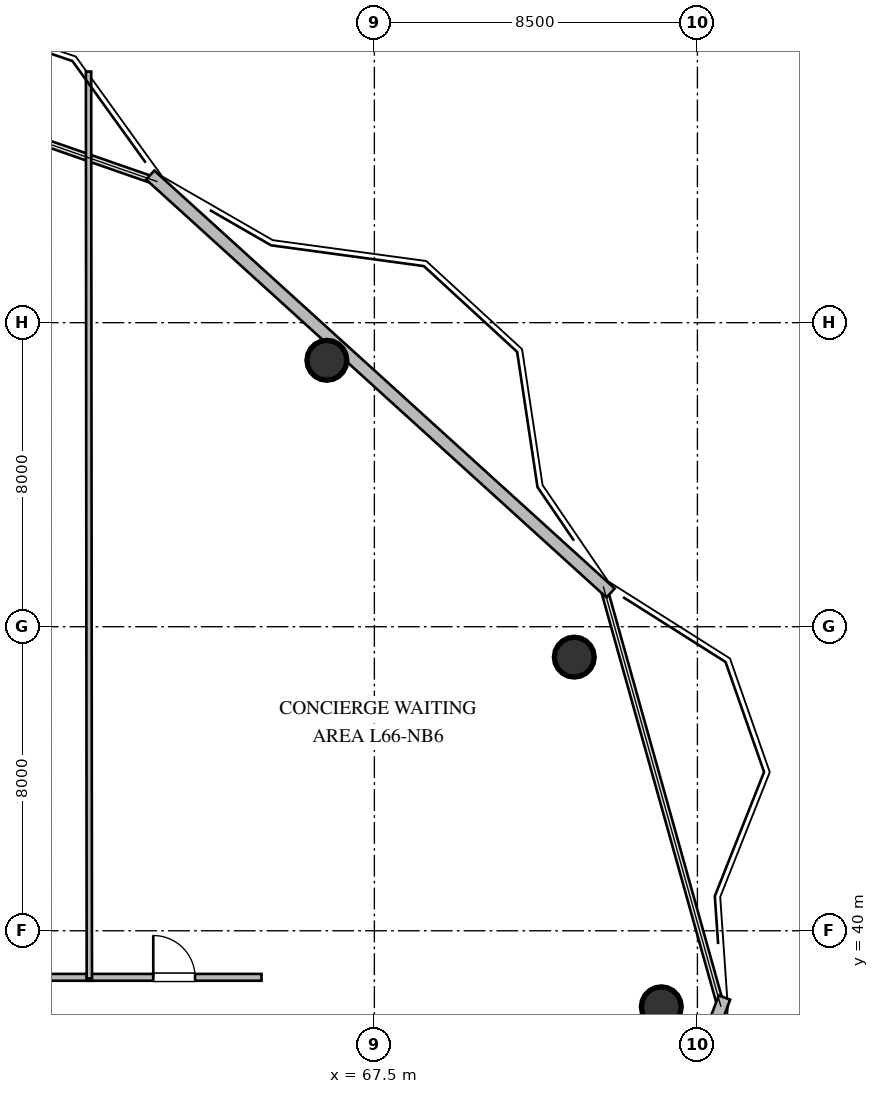
"""IFC4 building model, lengths in metres.
Left out: names, types, materials, properties, quantities, classifications, styles, units other than length and angle.
Written with IfcOpenShell. Run it as: python <this file> out.ifc"""

import sys

from ifc_helpers import new_model, si_unit, direction, frame, frame_2d, origin, origin_2d, place, context, subcontext, project, spatial, rectangle, circle, extrude, element, fill, save


model = new_model("IFC4")
c1 = context("Model", 3, precision=1e-05, world=origin(), true_north=direction((0.0, 1.0)))
c2 = subcontext(c1, "Body", "Model", "MODEL_VIEW")
j1 = project(units=[si_unit("LENGTHUNIT", "METRE"), si_unit("PLANEANGLEUNIT", "RADIAN")], contexts=[c1])
p1 = place(None, origin())
s1 = spatial("IfcSite", under=j1, at=p1, CompositionType="ELEMENT")
p2 = place(p1, origin())
s2 = spatial("IfcBuilding", under=s1, at=p2, CompositionType="ELEMENT")
p3 = place(p2, frame((0.0, 0.0, 249.6)))
s3 = spatial("IfcBuildingStorey", under=s2, at=p3, CompositionType="ELEMENT", Elevation=249.6)
for number, where, z_axis, x_axis in (
    (1, (75.05, 38.0, 0.0), (0.0, 0.0, 1.0), (1.0, 0.0, 0.0)),
    (2, (72.76, 47.2, 0.0), (0.0, 0.0, 1.0), (1.0, 0.0, 0.0)),
    (3, (66.25, 55.01, 0.0), (0.0, 0.0, 1.0), (1.0, 0.0, 0.0)),
):
    element("IfcColumn", number, at=place(p3, frame(where, z_axis=z_axis, x_axis=x_axis)), inside=s3, PredefinedType="COLUMN", context=c2, shape_type="SweptSolid", body=[
        extrude(circle(Radius=0.525, at=origin_2d()), origin(), (0.0, 0.0, 1.0), 3.6),
    ])
p4 = place(p3, frame((76.712, 38.243, 0.0), z_axis=(0.0, 0.0, 1.0), x_axis=(-0.353659523244, -0.935374225441, 0.0)))
e4 = element("IfcWall", 4, at=p4, inside=s3, PredefinedType="STANDARD", context=c2, shape_type="SweptSolid", body=[
    extrude(rectangle(XDim=14.172, YDim=0.32, at=frame_2d((7.086, 0.0))), origin(), (0.0, 0.0, 1.0), 3.28),
])
p5 = place(p3, frame((61.602, 59.884, 0.0), z_axis=(0.0, 0.0, 1.0), x_axis=(0.740416582554, -0.672148260638, 0.0)))
e5 = element("IfcWall", 5, at=p5, inside=s3, PredefinedType="STANDARD", context=c2, shape_type="SweptSolid", body=[
    extrude(rectangle(XDim=16.361, YDim=0.32, at=frame_2d((8.181, 0.0))), origin(), (0.0, 0.0, 1.0), 3.28),
])
p6 = place(p3, frame((54.935, 38.775, 0.0), z_axis=(0.0, 0.0, 1.0), x_axis=(1.0, 0.0, 0.0)))
e6 = element("IfcWall", 6, at=p6, inside=s3, PredefinedType="PARTITIONING", context=c2, shape_type="SweptSolid", body=[
    extrude(rectangle(XDim=5.13, YDim=0.18, at=frame_2d((2.565, 0.0))), origin(), (0.0, 0.0, 1.0), 3.28),
])
p7 = place(p6, frame((2.015, 0.0, 0.0)))
e7 = element("IfcOpeningElement", 7, at=p7, cuts=e6, PredefinedType="OPENING", context=c2, shape_type="SweptSolid", body=[
    extrude(rectangle(XDim=1.1, YDim=2.1, at=frame_2d((0.55, 1.05))), frame((0.0, 0.1, 0.0), z_axis=(0.0, -1.0, 0.0), x_axis=(1.0, 0.0, 0.0)), (0.0, 0.0, 1.0), 0.2),
])
p8 = place(p3, frame((59.935, 38.775, 0.0), z_axis=(0.0, 0.0, 1.0), x_axis=(1.0, 0.0, 0.0)))
e8 = element("IfcWall", 8, at=p8, inside=s3, PredefinedType="PARTITIONING", context=c2, shape_type="SweptSolid", body=[
    extrude(rectangle(XDim=4.595, YDim=0.18, at=frame_2d((2.297, 0.0))), origin(), (0.0, 0.0, 1.0), 3.28),
])
p9 = place(p8, frame((1.747, 0.0, 0.0)))
e9 = element("IfcOpeningElement", 9, at=p9, cuts=e8, PredefinedType="OPENING", context=c2, shape_type="SweptSolid", body=[
    extrude(rectangle(XDim=1.1, YDim=2.1, at=frame_2d((0.55, 1.05))), frame((0.0, 0.1, 0.0), z_axis=(0.0, -1.0, 0.0), x_axis=(1.0, 0.0, 0.0)), (0.0, 0.0, 1.0), 0.2),
])
p10 = place(p3, frame((59.979, 62.608, 0.0), z_axis=(0.0, 0.0, 1.0), x_axis=(0.000879867065, -0.999999612917, 0.0)))
e10 = element("IfcWall", 10, at=p10, inside=s3, PredefinedType="PARTITIONING", context=c2, shape_type="SweptSolid", body=[
    extrude(rectangle(XDim=23.863, YDim=0.14, at=frame_2d((11.931, 0.0))), origin(), (0.0, 0.0, 1.0), 2.916),
])
p11 = place(p9, origin())
e11 = element("IfcDoor", 11, at=p11, inside=s3, OperationType="SINGLE_SWING_LEFT", PredefinedType="DOOR", context=c2, shape_type="SweptSolid", body=[
    extrude(rectangle(XDim=1.1, YDim=2.1, at=frame_2d((0.55, 1.05))), frame((0.0, 0.025, 0.0), z_axis=(0.0, -1.0, 0.0), x_axis=(1.0, 0.0, 0.0)), (0.0, 0.0, 1.0), 0.05),
])
fill(e9, e11)
save(model, sys.argv[1])
